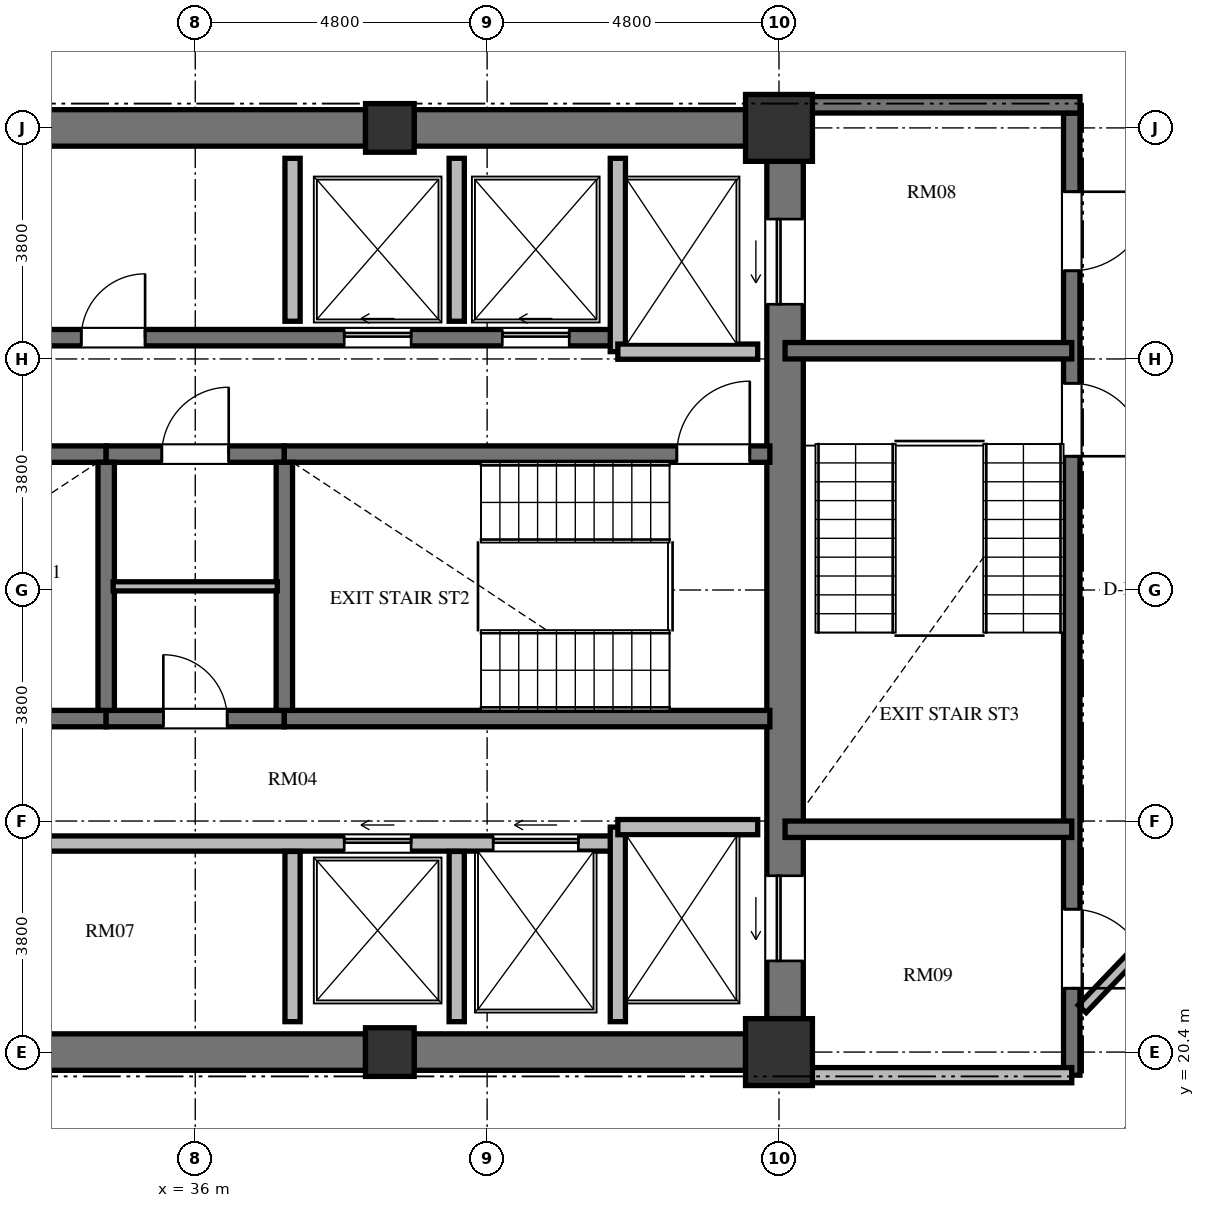
"""IFC4 building model, lengths in metres.
Left out: names, types, materials, properties, quantities, classifications, styles, units other than length and angle.
Written with IfcOpenShell. Run it as: python <this file> out.ifc"""

import sys

from ifc_helpers import new_model, si_unit, direction, frame, frame_2d, origin, origin_2d, place, context, subcontext, project, spatial, rectangle, extrude, element, fill, save


model = new_model("IFC4")
c1 = context("Model", 3, precision=1e-05, world=origin(), true_north=direction((0.0, 1.0)))
c2 = subcontext(c1, "Body", "Model", "MODEL_VIEW")
j1 = project(units=[si_unit("LENGTHUNIT", "METRE"), si_unit("PLANEANGLEUNIT", "RADIAN")], contexts=[c1])
p1 = place(None, origin())
s1 = spatial("IfcSite", under=j1, at=p1, CompositionType="ELEMENT")
p2 = place(p1, origin())
s2 = spatial("IfcBuilding", under=s1, at=p2, CompositionType="ELEMENT")
p3 = place(p2, frame((0.0, 0.0, 227.664)))
s3 = spatial("IfcBuildingStorey", under=s2, at=p3, CompositionType="ELEMENT", Elevation=227.664)
p4 = place(p3, frame((39.2, 20.4, 0.0), z_axis=(0.0, 0.0, 1.0), x_axis=(1.0, 0.0, 0.0)))
e1 = element("IfcColumn", 1, at=p4, inside=s3, PredefinedType="COLUMN", context=c2, shape_type="SweptSolid", body=[
    extrude(rectangle(XDim=0.8, YDim=0.8, at=origin_2d()), origin(), (0.0, 0.0, 1.0), 3.648),
])
for number, where, z_axis, x_axis in (
    (2, (45.6, 20.4, 0.0), (0.0, 0.0, 1.0), (1.0, 0.0, 0.0)),
    (3, (45.6, 35.6, 0.0), (0.0, 0.0, 1.0), (1.0, 0.0, 0.0)),
):
    element("IfcColumn", number, at=place(p3, frame(where, z_axis=z_axis, x_axis=x_axis)), inside=s3, PredefinedType="COLUMN", context=c2, shape_type="SweptSolid", body=[
        extrude(rectangle(XDim=1.1, YDim=1.1, at=origin_2d()), origin(), (0.0, 0.0, 1.0), 3.648),
    ])
p5 = place(p3, frame((39.2, 35.6, 0.0), z_axis=(0.0, 0.0, 1.0), x_axis=(1.0, 0.0, 0.0)))
e4 = element("IfcColumn", 4, at=p5, inside=s3, PredefinedType="COLUMN", context=c2, shape_type="SweptSolid", body=[
    extrude(rectangle(XDim=0.8, YDim=0.8, at=origin_2d()), origin(), (0.0, 0.0, 1.0), 3.648),
])
p6 = place(p3, frame((45.7, 20.95, 0.0), z_axis=(0.0, 0.0, 1.0), x_axis=(0.0, 1.0, 0.0)))
e5 = element("IfcWall", 5, at=p6, inside=s3, PredefinedType="SHEAR", context=c2, shape_type="SweptSolid", body=[
    extrude(rectangle(XDim=14.1, YDim=0.6, at=frame_2d((7.05, 0.0))), origin(), (0.0, 0.0, 1.0), 3.648),
])
p7 = place(p6, frame((11.75, 0.0, 0.0)))
e6 = element("IfcOpeningElement", 6, at=p7, cuts=e5, PredefinedType="OPENING", context=c2, shape_type="SweptSolid", body=[
    extrude(rectangle(XDim=1.4, YDim=2.3, at=frame_2d((0.7, 1.15))), frame((0.0, 0.31, 0.0), z_axis=(0.0, -1.0, 0.0), x_axis=(1.0, 0.0, 0.0)), (0.0, 0.0, 1.0), 0.62),
])
p8 = place(p6, frame((0.95, 0.0, 0.0)))
e7 = element("IfcOpeningElement", 7, at=p8, cuts=e5, PredefinedType="OPENING", context=c2, shape_type="SweptSolid", body=[
    extrude(rectangle(XDim=1.4, YDim=2.3, at=frame_2d((0.7, 1.15))), frame((0.0, 0.31, 0.0), z_axis=(0.0, -1.0, 0.0), x_axis=(1.0, 0.0, 0.0)), (0.0, 0.0, 1.0), 0.62),
])
for number, where, z_axis, x_axis in (
    (8, (33.2, 20.4, 0.0), (0.0, 0.0, 1.0), (1.0, 0.0, 0.0)),
    (9, (33.2, 35.6, 0.0), (0.0, 0.0, 1.0), (1.0, 0.0, 0.0)),
):
    element("IfcWall", number, at=place(p3, frame(where, z_axis=z_axis, x_axis=x_axis)), inside=s3, PredefinedType="SHEAR", context=c2, shape_type="SweptSolid", body=[
        extrude(rectangle(XDim=5.6, YDim=0.6, at=frame_2d((2.8, 0.0))), origin(), (0.0, 0.0, 1.0), 3.648),
    ])
for number, where, z_axis, x_axis in (
    (10, (39.6, 20.4, 0.0), (0.0, 0.0, 1.0), (1.0, 0.0, 0.0)),
    (11, (39.6, 35.6, 0.0), (0.0, 0.0, 1.0), (1.0, 0.0, 0.0)),
):
    element("IfcWall", number, at=place(p3, frame(where, z_axis=z_axis, x_axis=x_axis)), inside=s3, PredefinedType="SHEAR", context=c2, shape_type="SweptSolid", body=[
        extrude(rectangle(XDim=5.45, YDim=0.6, at=frame_2d((2.725, 0.0))), origin(), (0.0, 0.0, 1.0), 3.648),
    ])
p9 = place(p3, frame((26.55, 30.235, 0.0), z_axis=(0.0, 0.0, 1.0), x_axis=(1.0, 0.0, 0.0)))
e12 = element("IfcWall", 12, at=p9, inside=s3, PredefinedType="SHEAR", context=c2, shape_type="SweptSolid", body=[
    extrude(rectangle(XDim=7.985, YDim=0.27, at=frame_2d((3.992, 0.0))), origin(), (0.0, 0.0, 1.0), 3.648),
])
p10 = place(p3, frame((34.535, 30.235, 0.0), z_axis=(0.0, 0.0, 1.0), x_axis=(1.0, 0.0, 0.0)))
e13 = element("IfcWall", 13, at=p10, inside=s3, PredefinedType="SHEAR", context=c2, shape_type="SweptSolid", body=[
    extrude(rectangle(XDim=2.93, YDim=0.27, at=frame_2d((1.465, 0.0))), origin(), (0.0, 0.0, 1.0), 3.648),
])
p11 = place(p10, frame((0.915, 0.0, 0.0)))
e14 = element("IfcOpeningElement", 14, at=p11, cuts=e13, PredefinedType="OPENING", context=c2, shape_type="SweptSolid", body=[
    extrude(rectangle(XDim=1.1, YDim=2.15, at=frame_2d((0.55, 1.075))), frame((0.0, 0.145, 0.0), z_axis=(0.0, -1.0, 0.0), x_axis=(1.0, 0.0, 0.0)), (0.0, 0.0, 1.0), 0.29),
])
p12 = place(p3, frame((37.465, 30.235, 0.0), z_axis=(0.0, 0.0, 1.0), x_axis=(1.0, 0.0, 0.0)))
e15 = element("IfcWall", 15, at=p12, inside=s3, PredefinedType="SHEAR", context=c2, shape_type="SweptSolid", body=[
    extrude(rectangle(XDim=7.985, YDim=0.27, at=frame_2d((3.992, 0.0))), origin(), (0.0, 0.0, 1.0), 3.648),
])
p13 = place(p12, frame((6.455, 0.0, 0.0)))
e16 = element("IfcOpeningElement", 16, at=p13, cuts=e15, PredefinedType="OPENING", context=c2, shape_type="SweptSolid", body=[
    extrude(rectangle(XDim=1.2, YDim=2.15, at=frame_2d((0.6, 1.075))), frame((0.0, 0.145, 0.0), z_axis=(0.0, -1.0, 0.0), x_axis=(1.0, 0.0, 0.0)), (0.0, 0.0, 1.0), 0.29),
])
p14 = place(p3, frame((26.55, 25.885, 0.0), z_axis=(0.0, 0.0, 1.0), x_axis=(1.0, 0.0, 0.0)))
e17 = element("IfcWall", 17, at=p14, inside=s3, PredefinedType="SHEAR", context=c2, shape_type="SweptSolid", body=[
    extrude(rectangle(XDim=7.985, YDim=0.27, at=frame_2d((3.992, 0.0))), origin(), (0.0, 0.0, 1.0), 3.648),
])
p15 = place(p3, frame((34.535, 25.885, 0.0), z_axis=(0.0, 0.0, 1.0), x_axis=(1.0, 0.0, 0.0)))
e18 = element("IfcWall", 18, at=p15, inside=s3, PredefinedType="SHEAR", context=c2, shape_type="SweptSolid", body=[
    extrude(rectangle(XDim=2.93, YDim=0.27, at=frame_2d((1.465, 0.0))), origin(), (0.0, 0.0, 1.0), 3.648),
])
p16 = place(p15, frame((0.94, 0.0, 0.0)))
e19 = element("IfcOpeningElement", 19, at=p16, cuts=e18, PredefinedType="OPENING", context=c2, shape_type="SweptSolid", body=[
    extrude(rectangle(XDim=1.05, YDim=2.15, at=frame_2d((0.525, 1.075))), frame((0.0, 0.145, 0.0), z_axis=(0.0, -1.0, 0.0), x_axis=(1.0, 0.0, 0.0)), (0.0, 0.0, 1.0), 0.29),
])
p17 = place(p3, frame((37.465, 25.885, 0.0), z_axis=(0.0, 0.0, 1.0), x_axis=(1.0, 0.0, 0.0)))
e20 = element("IfcWall", 20, at=p17, inside=s3, PredefinedType="SHEAR", context=c2, shape_type="SweptSolid", body=[
    extrude(rectangle(XDim=7.985, YDim=0.27, at=frame_2d((3.992, 0.0))), origin(), (0.0, 0.0, 1.0), 3.648),
])
for number, where, z_axis, x_axis in (
    (21, (34.535, 26.02, 0.0), (0.0, 0.0, 1.0), (0.0, 1.0, 0.0)),
    (22, (37.465, 26.02, 0.0), (0.0, 0.0, 1.0), (0.0, 1.0, 0.0)),
):
    element("IfcWall", number, at=place(p3, frame(where, z_axis=z_axis, x_axis=x_axis)), inside=s3, PredefinedType="SHEAR", context=c2, shape_type="SweptSolid", body=[
        extrude(rectangle(XDim=4.08, YDim=0.27, at=frame_2d((2.04, 0.0))), origin(), (0.0, 0.0, 1.0), 3.648),
    ])
p18 = place(p3, frame((34.65, 28.06, 0.0), z_axis=(0.0, 0.0, 1.0), x_axis=(1.0, 0.0, 0.0)))
e23 = element("IfcWall", 23, at=p18, inside=s3, PredefinedType="PARTITIONING", context=c2, shape_type="SweptSolid", body=[
    extrude(rectangle(XDim=2.7, YDim=0.15, at=frame_2d((1.35, 0.0))), origin(), (0.0, 0.0, 1.0), 3.448),
])
p19 = place(p3, frame((26.55, 32.15, 0.0), z_axis=(0.0, 0.0, 1.0), x_axis=(1.0, 0.0, 0.0)))
e24 = element("IfcWall", 24, at=p19, inside=s3, PredefinedType="SHEAR", context=c2, shape_type="SweptSolid", body=[
    extrude(rectangle(XDim=16.4, YDim=0.27, at=frame_2d((8.2, 0.0))), origin(), (0.0, 0.0, 1.0), 3.648),
])
p20 = place(p19, frame((2.175, 0.0, 0.0)))
e25 = element("IfcOpeningElement", 25, at=p20, cuts=e24, PredefinedType="OPENING", context=c2, shape_type="SweptSolid", body=[
    extrude(rectangle(XDim=1.05, YDim=2.15, at=frame_2d((0.525, 1.075))), frame((0.0, 0.145, 0.0), z_axis=(0.0, -1.0, 0.0), x_axis=(1.0, 0.0, 0.0)), (0.0, 0.0, 1.0), 0.29),
])
p21 = place(p19, frame((7.575, 0.0, 0.0)))
e26 = element("IfcOpeningElement", 26, at=p21, cuts=e24, PredefinedType="OPENING", context=c2, shape_type="SweptSolid", body=[
    extrude(rectangle(XDim=1.05, YDim=2.15, at=frame_2d((0.525, 1.075))), frame((0.0, 0.145, 0.0), z_axis=(0.0, -1.0, 0.0), x_axis=(1.0, 0.0, 0.0)), (0.0, 0.0, 1.0), 0.29),
])
p22 = place(p19, frame((11.9, 0.0, 0.0)))
e27 = element("IfcOpeningElement", 27, at=p22, cuts=e24, PredefinedType="OPENING", context=c2, shape_type="SweptSolid", body=[
    extrude(rectangle(XDim=1.1, YDim=2.2, at=frame_2d((0.55, 1.1))), frame((0.0, 0.145, 0.0), z_axis=(0.0, -1.0, 0.0), x_axis=(1.0, 0.0, 0.0)), (0.0, 0.0, 1.0), 0.29),
])
p23 = place(p19, frame((14.5, 0.0, 0.0)))
e28 = element("IfcOpeningElement", 28, at=p23, cuts=e24, PredefinedType="OPENING", context=c2, shape_type="SweptSolid", body=[
    extrude(rectangle(XDim=1.1, YDim=2.2, at=frame_2d((0.55, 1.1))), frame((0.0, 0.145, 0.0), z_axis=(0.0, -1.0, 0.0), x_axis=(1.0, 0.0, 0.0)), (0.0, 0.0, 1.0), 0.29),
])
p24 = place(p3, frame((26.75, 23.83, 0.0), z_axis=(0.0, 0.0, 1.0), x_axis=(1.0, 0.0, 0.0)))
e29 = element("IfcWall", 29, at=p24, inside=s3, PredefinedType="SOLIDWALL", context=c2, shape_type="SweptSolid", body=[
    extrude(rectangle(XDim=16.2, YDim=0.25, at=frame_2d((8.1, 0.0))), origin(), (0.0, 0.0, 1.0), 3.448),
])
p25 = place(p24, frame((4.75, 0.0, 0.0)))
e30 = element("IfcOpeningElement", 30, at=p25, cuts=e29, PredefinedType="OPENING", context=c2, shape_type="SweptSolid", body=[
    extrude(rectangle(XDim=1.4, YDim=2.2, at=frame_2d((0.7, 1.1))), frame((0.0, 0.135, 0.0), z_axis=(0.0, -1.0, 0.0), x_axis=(1.0, 0.0, 0.0)), (0.0, 0.0, 1.0), 0.27),
])
p26 = place(p24, frame((11.7, 0.0, 0.0)))
e31 = element("IfcOpeningElement", 31, at=p26, cuts=e29, PredefinedType="OPENING", context=c2, shape_type="SweptSolid", body=[
    extrude(rectangle(XDim=1.1, YDim=2.2, at=frame_2d((0.55, 1.1))), frame((0.0, 0.135, 0.0), z_axis=(0.0, -1.0, 0.0), x_axis=(1.0, 0.0, 0.0)), (0.0, 0.0, 1.0), 0.27),
])
p27 = place(p24, frame((14.15, 0.0, 0.0)))
e32 = element("IfcOpeningElement", 32, at=p27, cuts=e29, PredefinedType="OPENING", context=c2, shape_type="SweptSolid", body=[
    extrude(rectangle(XDim=1.4, YDim=2.3, at=frame_2d((0.7, 1.15))), frame((0.0, 0.135, 0.0), z_axis=(0.0, -1.0, 0.0), x_axis=(1.0, 0.0, 0.0)), (0.0, 0.0, 1.0), 0.27),
])
p28 = place(p3, frame((42.95, 31.92, 0.0), z_axis=(0.0, 0.0, 1.0), x_axis=(0.0, 1.0, 0.0)))
e33 = element("IfcWall", 33, at=p28, inside=s3, PredefinedType="SOLIDWALL", context=c2, shape_type="SweptSolid", body=[
    extrude(rectangle(XDim=3.18, YDim=0.25, at=frame_2d((1.59, 0.0))), origin(), (0.0, 0.0, 1.0), 3.448),
])
p29 = place(p3, frame((42.95, 31.92, 0.0), z_axis=(0.0, 0.0, 1.0), x_axis=(1.0, 0.0, 0.0)))
e34 = element("IfcWall", 34, at=p29, inside=s3, PredefinedType="SOLIDWALL", context=c2, shape_type="SweptSolid", body=[
    extrude(rectangle(XDim=2.3, YDim=0.25, at=frame_2d((1.15, 0.0))), origin(), (0.0, 0.0, 1.0), 3.448),
])
p30 = place(p3, frame((42.95, 20.9, 0.0), z_axis=(0.0, 0.0, 1.0), x_axis=(0.0, 1.0, 0.0)))
e35 = element("IfcWall", 35, at=p30, inside=s3, PredefinedType="SOLIDWALL", context=c2, shape_type="SweptSolid", body=[
    extrude(rectangle(XDim=3.2, YDim=0.25, at=frame_2d((1.6, 0.0))), origin(), (0.0, 0.0, 1.0), 3.448),
])
p31 = place(p3, frame((42.95, 24.1, 0.0), z_axis=(0.0, 0.0, 1.0), x_axis=(1.0, 0.0, 0.0)))
e36 = element("IfcWall", 36, at=p31, inside=s3, PredefinedType="SOLIDWALL", context=c2, shape_type="SweptSolid", body=[
    extrude(rectangle(XDim=2.3, YDim=0.25, at=frame_2d((1.15, 0.0))), origin(), (0.0, 0.0, 1.0), 3.448),
])
p32 = place(p3, frame((37.6, 32.42, 0.0), z_axis=(0.0, 0.0, 1.0), x_axis=(0.0, 1.0, 0.0)))
e37 = element("IfcWall", 37, at=p32, inside=s3, PredefinedType="SOLIDWALL", context=c2, shape_type="SweptSolid", body=[
    extrude(rectangle(XDim=2.68, YDim=0.25, at=frame_2d((1.34, 0.0))), origin(), (0.0, 0.0, 1.0), 3.448),
])
p33 = place(p3, frame((37.6, 20.9, 0.0), z_axis=(0.0, 0.0, 1.0), x_axis=(0.0, 1.0, 0.0)))
e38 = element("IfcWall", 38, at=p33, inside=s3, PredefinedType="SOLIDWALL", context=c2, shape_type="SweptSolid", body=[
    extrude(rectangle(XDim=2.8, YDim=0.25, at=frame_2d((1.4, 0.0))), origin(), (0.0, 0.0, 1.0), 3.448),
])
p34 = place(p3, frame((40.3, 32.42, 0.0), z_axis=(0.0, 0.0, 1.0), x_axis=(0.0, 1.0, 0.0)))
e39 = element("IfcWall", 39, at=p34, inside=s3, PredefinedType="SOLIDWALL", context=c2, shape_type="SweptSolid", body=[
    extrude(rectangle(XDim=2.68, YDim=0.25, at=frame_2d((1.34, 0.0))), origin(), (0.0, 0.0, 1.0), 3.448),
])
p35 = place(p3, frame((40.3, 20.9, 0.0), z_axis=(0.0, 0.0, 1.0), x_axis=(0.0, 1.0, 0.0)))
e40 = element("IfcWall", 40, at=p35, inside=s3, PredefinedType="SOLIDWALL", context=c2, shape_type="SweptSolid", body=[
    extrude(rectangle(XDim=2.8, YDim=0.25, at=frame_2d((1.4, 0.0))), origin(), (0.0, 0.0, 1.0), 3.448),
])
p36 = place(p3, frame((50.415, 35.845, 0.0), z_axis=(0.0, 0.0, 1.0), x_axis=(0.0, -1.0, 0.0)))
e41 = element("IfcWall", 41, at=p36, inside=s3, PredefinedType="SHEAR", context=c2, shape_type="SweptSolid", body=[
    extrude(rectangle(XDim=15.825, YDim=0.27, at=frame_2d((7.913, 0.0))), origin(), (0.0, 0.0, 1.0), 3.648),
])
p37 = place(p36, frame((4.445, 0.0, 0.0)))
e42 = element("IfcOpeningElement", 42, at=p37, cuts=e41, PredefinedType="OPENING", context=c2, shape_type="SweptSolid", body=[
    extrude(rectangle(XDim=1.2, YDim=2.15, at=frame_2d((0.6, 1.075))), frame((0.0, 0.145, 0.0), z_axis=(0.0, -1.0, 0.0), x_axis=(1.0, 0.0, 0.0)), (0.0, 0.0, 1.0), 0.29),
])
p38 = place(p36, frame((1.295, 0.0, 0.0)))
e43 = element("IfcOpeningElement", 43, at=p38, cuts=e41, PredefinedType="OPENING", context=c2, shape_type="SweptSolid", body=[
    extrude(rectangle(XDim=1.3, YDim=2.2, at=frame_2d((0.65, 1.1))), frame((0.0, 0.145, 0.0), z_axis=(0.0, -1.0, 0.0), x_axis=(1.0, 0.0, 0.0)), (0.0, 0.0, 1.0), 0.29),
])
p39 = place(p36, frame((13.095, 0.0, 0.0)))
e44 = element("IfcOpeningElement", 44, at=p39, cuts=e41, PredefinedType="OPENING", context=c2, shape_type="SweptSolid", body=[
    extrude(rectangle(XDim=1.3, YDim=2.2, at=frame_2d((0.65, 1.1))), frame((0.0, 0.145, 0.0), z_axis=(0.0, -1.0, 0.0), x_axis=(1.0, 0.0, 0.0)), (0.0, 0.0, 1.0), 0.29),
])
p40 = place(p3, frame((46.0, 35.98, 0.0), z_axis=(0.0, 0.0, 1.0), x_axis=(1.0, 0.0, 0.0)))
e45 = element("IfcWall", 45, at=p40, inside=s3, PredefinedType="SHEAR", context=c2, shape_type="SweptSolid", body=[
    extrude(rectangle(XDim=4.55, YDim=0.27, at=frame_2d((2.275, 0.0))), origin(), (0.0, 0.0, 1.0), 3.648),
])
for number, where, z_axis, x_axis in (
    (46, (45.7, 31.935, 0.0), (0.0, 0.0, 1.0), (1.0, 0.0, 0.0)),
    (47, (45.7, 24.065, 0.0), (0.0, 0.0, 1.0), (1.0, 0.0, 0.0)),
):
    element("IfcWall", number, at=place(p3, frame(where, z_axis=z_axis, x_axis=x_axis)), inside=s3, PredefinedType="SHEAR", context=c2, shape_type="SweptSolid", body=[
        extrude(rectangle(XDim=4.715, YDim=0.27, at=frame_2d((2.357, 0.0))), origin(), (0.0, 0.0, 1.0), 3.648),
    ])
p41 = place(p3, frame((45.7, 20.02, 0.0), z_axis=(0.0, 0.0, 1.0), x_axis=(1.0, 0.0, 0.0)))
e48 = element("IfcWall", 48, at=p41, inside=s3, PredefinedType="SOLIDWALL", context=c2, shape_type="SweptSolid", body=[
    extrude(rectangle(XDim=4.715, YDim=0.25, at=frame_2d((2.357, 0.0))), origin(), (0.0, 0.0, 1.0), 3.448),
])
p42 = place(p3, frame((53.078, 23.714, 0.0), z_axis=(0.0, 0.0, 1.0), x_axis=(-0.691353379446, -0.722516785085, 0.0)))
e49 = element("IfcWall", 49, at=p42, inside=s3, PredefinedType="PARTITIONING", context=c2, shape_type="SweptSolid", body=[
    extrude(rectangle(XDim=3.604, YDim=0.18, at=frame_2d((1.802, 0.0))), origin(), (0.0, 0.0, 1.0), 3.448),
])
p43 = place(p13, origin())
e50 = element("IfcDoor", 50, at=p43, inside=s3, OperationType="SINGLE_SWING_RIGHT", PredefinedType="DOOR", context=c2, shape_type="SweptSolid", body=[
    extrude(rectangle(XDim=1.2, YDim=2.15, at=frame_2d((0.6, 1.075))), frame((0.0, 0.025, 0.0), z_axis=(0.0, -1.0, 0.0), x_axis=(1.0, 0.0, 0.0)), (0.0, 0.0, 1.0), 0.05),
])
fill(e16, e50)
p44 = place(p16, origin())
e51 = element("IfcDoor", 51, at=p44, inside=s3, OperationType="SINGLE_SWING_LEFT", PredefinedType="DOOR", context=c2, shape_type="SweptSolid", body=[
    extrude(rectangle(XDim=1.05, YDim=2.15, at=frame_2d((0.525, 1.075))), frame((0.0, 0.025, 0.0), z_axis=(0.0, -1.0, 0.0), x_axis=(1.0, 0.0, 0.0)), (0.0, 0.0, 1.0), 0.05),
])
fill(e19, e51)
p45 = place(p11, origin())
e52 = element("IfcDoor", 52, at=p45, inside=s3, OperationType="SINGLE_SWING_RIGHT", PredefinedType="DOOR", context=c2, shape_type="SweptSolid", body=[
    extrude(rectangle(XDim=1.1, YDim=2.15, at=frame_2d((0.55, 1.075))), frame((0.0, 0.025, 0.0), z_axis=(0.0, -1.0, 0.0), x_axis=(1.0, 0.0, 0.0)), (0.0, 0.0, 1.0), 0.05),
])
fill(e14, e52)
p46 = place(p21, origin())
e53 = element("IfcDoor", 53, at=p46, inside=s3, OperationType="SINGLE_SWING_RIGHT", PredefinedType="DOOR", context=c2, shape_type="SweptSolid", body=[
    extrude(rectangle(XDim=1.05, YDim=2.15, at=frame_2d((0.525, 1.075))), frame((0.0, 0.025, 0.0), z_axis=(0.0, -1.0, 0.0), x_axis=(1.0, 0.0, 0.0)), (0.0, 0.0, 1.0), 0.05),
])
fill(e26, e53)
p47 = place(p22, origin())
e54 = element("IfcDoor", 54, at=p47, inside=s3, OperationType="SLIDING_TO_LEFT", PredefinedType="DOOR", context=c2, shape_type="SweptSolid", body=[
    extrude(rectangle(XDim=1.1, YDim=2.2, at=frame_2d((0.55, 1.1))), frame((0.0, 0.025, 0.0), z_axis=(0.0, -1.0, 0.0), x_axis=(1.0, 0.0, 0.0)), (0.0, 0.0, 1.0), 0.05),
])
fill(e27, e54)
p48 = place(p23, origin())
e55 = element("IfcDoor", 55, at=p48, inside=s3, OperationType="SLIDING_TO_LEFT", PredefinedType="DOOR", context=c2, shape_type="SweptSolid", body=[
    extrude(rectangle(XDim=1.1, YDim=2.2, at=frame_2d((0.55, 1.1))), frame((0.0, 0.025, 0.0), z_axis=(0.0, -1.0, 0.0), x_axis=(1.0, 0.0, 0.0)), (0.0, 0.0, 1.0), 0.05),
])
fill(e28, e55)
p49 = place(p26, origin())
e56 = element("IfcDoor", 56, at=p49, inside=s3, OperationType="SLIDING_TO_LEFT", PredefinedType="DOOR", context=c2, shape_type="SweptSolid", body=[
    extrude(rectangle(XDim=1.1, YDim=2.2, at=frame_2d((0.55, 1.1))), frame((0.0, 0.025, 0.0), z_axis=(0.0, -1.0, 0.0), x_axis=(1.0, 0.0, 0.0)), (0.0, 0.0, 1.0), 0.05),
])
fill(e31, e56)
p50 = place(p7, origin())
e57 = element("IfcDoor", 57, at=p50, inside=s3, OperationType="SLIDING_TO_LEFT", PredefinedType="DOOR", context=c2, shape_type="SweptSolid", body=[
    extrude(rectangle(XDim=1.4, YDim=2.3, at=frame_2d((0.7, 1.15))), frame((0.0, 0.025, 0.0), z_axis=(0.0, -1.0, 0.0), x_axis=(1.0, 0.0, 0.0)), (0.0, 0.0, 1.0), 0.05),
])
fill(e6, e57)
p51 = place(p8, origin())
e58 = element("IfcDoor", 58, at=p51, inside=s3, OperationType="SLIDING_TO_LEFT", PredefinedType="DOOR", context=c2, shape_type="SweptSolid", body=[
    extrude(rectangle(XDim=1.4, YDim=2.3, at=frame_2d((0.7, 1.15))), frame((0.0, 0.025, 0.0), z_axis=(0.0, -1.0, 0.0), x_axis=(1.0, 0.0, 0.0)), (0.0, 0.0, 1.0), 0.05),
])
fill(e7, e58)
p52 = place(p27, origin())
e59 = element("IfcDoor", 59, at=p52, inside=s3, OperationType="SLIDING_TO_LEFT", PredefinedType="DOOR", context=c2, shape_type="SweptSolid", body=[
    extrude(rectangle(XDim=1.4, YDim=2.3, at=frame_2d((0.7, 1.15))), frame((0.0, 0.025, 0.0), z_axis=(0.0, -1.0, 0.0), x_axis=(1.0, 0.0, 0.0)), (0.0, 0.0, 1.0), 0.05),
])
fill(e32, e59)
p53 = place(p37, origin())
e60 = element("IfcDoor", 60, at=p53, inside=s3, OperationType="SINGLE_SWING_RIGHT", PredefinedType="DOOR", context=c2, shape_type="SweptSolid", body=[
    extrude(rectangle(XDim=1.2, YDim=2.15, at=frame_2d((0.6, 1.075))), frame((0.0, 0.025, 0.0), z_axis=(0.0, -1.0, 0.0), x_axis=(1.0, 0.0, 0.0)), (0.0, 0.0, 1.0), 0.05),
])
fill(e42, e60)
p54 = place(p38, origin())
e61 = element("IfcDoor", 61, at=p54, inside=s3, OperationType="SINGLE_SWING_LEFT", PredefinedType="DOOR", context=c2, shape_type="SweptSolid", body=[
    extrude(rectangle(XDim=1.3, YDim=2.2, at=frame_2d((0.65, 1.1))), frame((0.0, 0.025, 0.0), z_axis=(0.0, -1.0, 0.0), x_axis=(1.0, 0.0, 0.0)), (0.0, 0.0, 1.0), 0.05),
])
fill(e43, e61)
p55 = place(p39, origin())
e62 = element("IfcDoor", 62, at=p55, inside=s3, OperationType="SINGLE_SWING_RIGHT", PredefinedType="DOOR", context=c2, shape_type="SweptSolid", body=[
    extrude(rectangle(XDim=1.3, YDim=2.2, at=frame_2d((0.65, 1.1))), frame((0.0, 0.025, 0.0), z_axis=(0.0, -1.0, 0.0), x_axis=(1.0, 0.0, 0.0)), (0.0, 0.0, 1.0), 0.05),
])
fill(e44, e62)
save(model, sys.argv[1])
